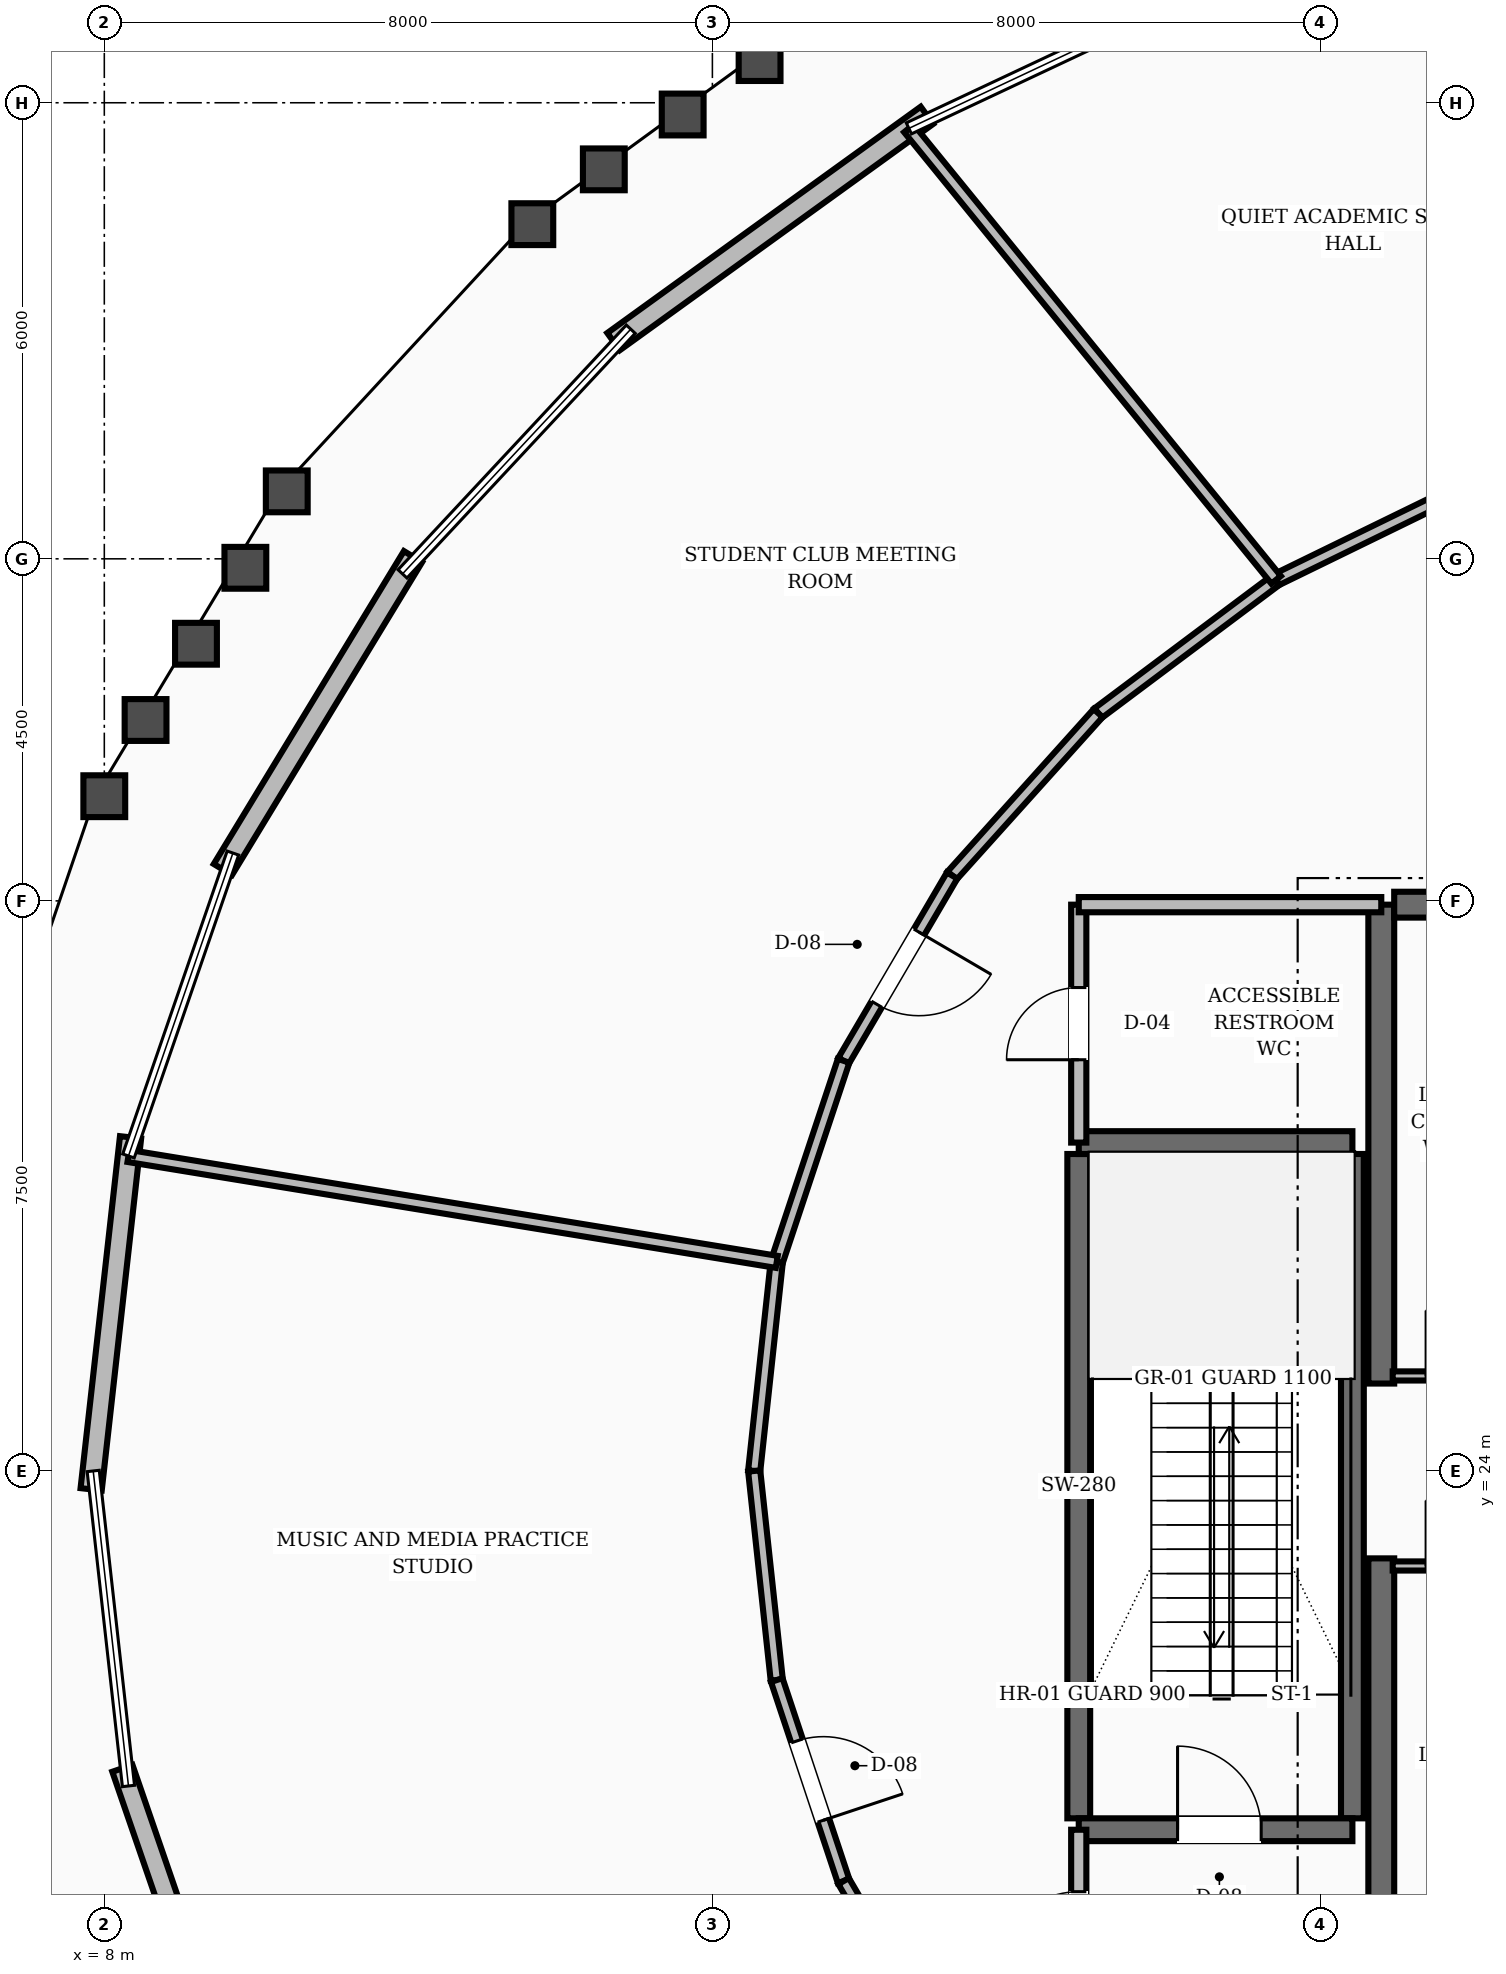
"""IFC4 building model, lengths in metres.
Left out: names, types, materials, properties, quantities, classifications, styles, units other than length and angle.
Written with IfcOpenShell. Run it as: python <this file> out.ifc"""

import sys

from ifc_helpers import new_model, si_unit, direction, frame, frame_2d, origin, place, context, subcontext, project, spatial, rectangle, extrude, element, fill, save


model = new_model("IFC4")
c1 = context("Model", 3, precision=1e-05, world=origin(), true_north=direction((0.0, 1.0)))
c2 = subcontext(c1, "Body", "Model", "MODEL_VIEW")
j1 = project(units=[si_unit("LENGTHUNIT", "METRE"), si_unit("PLANEANGLEUNIT", "RADIAN")], contexts=[c1])
p1 = place(None, origin())
s1 = spatial("IfcSite", under=j1, at=p1, CompositionType="ELEMENT")
p2 = place(p1, origin())
s2 = spatial("IfcBuilding", under=s1, at=p2, CompositionType="ELEMENT")
p3 = place(p2, frame((0.0, 0.0, 203.6)))
s3 = spatial("IfcBuildingStorey", under=s2, at=p3, CompositionType="ELEMENT", Elevation=203.6)
for number, where, z_axis, x_axis in (
    (1, (24.8, 16.55, 0.0), (0.0, 0.0, 1.0), (0.0, 1.0, 0.0)),
    (2, (24.8, 25.15, 0.0), (0.0, 0.0, 1.0), (0.0, 1.0, 0.0)),
):
    element("IfcWall", number, at=place(p3, frame(where, z_axis=z_axis, x_axis=x_axis)), inside=s3, PredefinedType="SHEAR", context=c2, shape_type="SweptSolid", body=[
        extrude(rectangle(XDim=6.3, YDim=0.34, at=frame_2d((3.15, 0.0))), origin(), (0.0, 0.0, 1.0), 4.8),
    ])
p4 = place(p3, frame((24.97, 31.45, 0.0), z_axis=(0.0, 0.0, 1.0), x_axis=(1.0, 0.0, 0.0)))
e3 = element("IfcWall", 3, at=p4, inside=s3, PredefinedType="SHEAR", context=c2, shape_type="SweptSolid", body=[
    extrude(rectangle(XDim=3.23, YDim=0.34, at=frame_2d((1.615, 0.0))), origin(), (0.0, 0.0, 1.0), 4.8),
])
for number, where, z_axis, x_axis in (
    (4, (20.82, 19.43, 0.0), (0.0, 0.0, 1.0), (0.0, 1.0, 0.0)),
    (5, (24.42, 19.43, 0.0), (0.0, 0.0, 1.0), (0.0, 1.0, 0.0)),
):
    element("IfcWall", number, at=place(p3, frame(where, z_axis=z_axis, x_axis=x_axis)), inside=s3, PredefinedType="SHEAR", context=c2, shape_type="SweptSolid", body=[
        extrude(rectangle(XDim=8.74, YDim=0.3, at=frame_2d((4.37, 0.0))), origin(), (0.0, 0.0, 1.0), 4.8),
    ])
p5 = place(p3, frame((20.82, 19.28, 0.0), z_axis=(0.0, 0.0, 1.0), x_axis=(1.0, 0.0, 0.0)))
e6 = element("IfcWall", 6, at=p5, inside=s3, PredefinedType="SHEAR", context=c2, shape_type="SweptSolid", body=[
    extrude(rectangle(XDim=3.6, YDim=0.3, at=frame_2d((1.8, 0.0))), origin(), (0.0, 0.0, 1.0), 4.8),
])
p6 = place(p5, frame((1.3, 0.0, 0.0)))
e7 = element("IfcOpeningElement", 7, at=p6, cuts=e6, PredefinedType="OPENING", context=c2, shape_type="SweptSolid", body=[
    extrude(rectangle(XDim=1.1, YDim=2.1, at=frame_2d((0.55, 1.05))), frame((0.0, 0.16, 0.0), z_axis=(0.0, -1.0, 0.0), x_axis=(1.0, 0.0, 0.0)), (0.0, 0.0, 1.0), 0.32),
])
p7 = place(p3, frame((20.82, 28.32, 0.0), z_axis=(0.0, 0.0, 1.0), x_axis=(1.0, 0.0, 0.0)))
e8 = element("IfcWall", 8, at=p7, inside=s3, PredefinedType="SHEAR", context=c2, shape_type="SweptSolid", body=[
    extrude(rectangle(XDim=3.6, YDim=0.3, at=frame_2d((1.8, 0.0))), origin(), (0.0, 0.0, 1.0), 4.8),
])
p8 = place(p3, frame((18.823, 41.834, 0.0), z_axis=(0.0, 0.0, 1.0), x_axis=(-0.810767835241, -0.585367847886, 0.0)))
e9 = element("IfcWall", 9, at=p8, inside=s3, PredefinedType="STANDARD", context=c2, shape_type="SweptSolid", body=[
    extrude(rectangle(XDim=5.085, YDim=0.28, at=frame_2d((2.543, 0.0))), origin(), (0.0, 0.0, 1.0), 3.71),
])
p9 = place(p3, frame((12.061, 36.029, 0.0), z_axis=(0.0, 0.0, 1.0), x_axis=(-0.519273052392, -0.854608388129, 0.0)))
e10 = element("IfcWall", 10, at=p9, inside=s3, PredefinedType="STANDARD", context=c2, shape_type="SweptSolid", body=[
    extrude(rectangle(XDim=4.817, YDim=0.28, at=frame_2d((2.408, 0.0))), origin(), (0.0, 0.0, 1.0), 3.71),
])
p10 = place(p3, frame((8.345, 28.389, 0.0), z_axis=(0.0, 0.0, 1.0), x_axis=(-0.111236598317, -0.993793952082, 0.0)))
e11 = element("IfcWall", 11, at=p10, inside=s3, PredefinedType="STANDARD", context=c2, shape_type="SweptSolid", body=[
    extrude(rectangle(XDim=4.659, YDim=0.28, at=frame_2d((2.33, 0.0))), origin(), (0.0, 0.0, 1.0), 3.71),
])
p11 = place(p3, frame((8.238, 20.088, 0.0), z_axis=(0.0, 0.0, 1.0), x_axis=(0.325950789295, -0.945386737244, 0.0)))
e12 = element("IfcWall", 12, at=p11, inside=s3, PredefinedType="STANDARD", context=c2, shape_type="SweptSolid", body=[
    extrude(rectangle(XDim=4.715, YDim=0.28, at=frame_2d((2.357, 0.0))), origin(), (0.0, 0.0, 1.0), 3.71),
])
p12 = place(p3, frame((20.82, 16.55, 0.0), z_axis=(0.0, 0.0, 1.0), x_axis=(0.0, 1.0, 0.0)))
e13 = element("IfcWall", 13, at=p12, inside=s3, PredefinedType="SOLIDWALL", context=c2, shape_type="SweptSolid", body=[
    extrude(rectangle(XDim=2.73, YDim=0.2, at=frame_2d((1.365, 0.0))), origin(), (0.0, 0.0, 1.0), 3.71),
])
p13 = place(p12, frame((0.815, 0.0, 0.0)))
e14 = element("IfcOpeningElement", 14, at=p13, cuts=e13, PredefinedType="OPENING", context=c2, shape_type="SweptSolid", body=[
    extrude(rectangle(XDim=1.1, YDim=2.1, at=frame_2d((0.55, 1.05))), frame((0.0, 0.11, 0.0), z_axis=(0.0, -1.0, 0.0), x_axis=(1.0, 0.0, 0.0)), (0.0, 0.0, 1.0), 0.22),
])
p14 = place(p3, frame((20.82, 28.32, 0.0), z_axis=(0.0, 0.0, 1.0), x_axis=(0.0, 1.0, 0.0)))
e15 = element("IfcWall", 15, at=p14, inside=s3, PredefinedType="SOLIDWALL", context=c2, shape_type="SweptSolid", body=[
    extrude(rectangle(XDim=3.13, YDim=0.2, at=frame_2d((1.565, 0.0))), origin(), (0.0, 0.0, 1.0), 3.71),
])
p15 = place(p14, frame((1.09, 0.0, 0.0)))
e16 = element("IfcOpeningElement", 16, at=p15, cuts=e15, PredefinedType="OPENING", context=c2, shape_type="SweptSolid", body=[
    extrude(rectangle(XDim=0.95, YDim=2.1, at=frame_2d((0.475, 1.05))), frame((0.0, 0.11, 0.0), z_axis=(0.0, -1.0, 0.0), x_axis=(1.0, 0.0, 0.0)), (0.0, 0.0, 1.0), 0.22),
])
p16 = place(p3, frame((20.82, 31.45, 0.0), z_axis=(0.0, 0.0, 1.0), x_axis=(1.0, 0.0, 0.0)))
e17 = element("IfcWall", 17, at=p16, inside=s3, PredefinedType="SOLIDWALL", context=c2, shape_type="SweptSolid", body=[
    extrude(rectangle(XDim=3.98, YDim=0.2, at=frame_2d((1.99, 0.0))), origin(), (0.0, 0.0, 1.0), 3.71),
])
p17 = place(p3, frame((24.95, 25.25, 0.0), z_axis=(0.0, 0.0, 1.0), x_axis=(1.0, 0.0, 0.0)))
e18 = element("IfcWall", 18, at=p17, inside=s3, PredefinedType="PARTITIONING", context=c2, shape_type="SweptSolid", body=[
    extrude(rectangle(XDim=3.2, YDim=0.12, at=frame_2d((1.6, 0.0))), origin(), (0.0, 0.0, 1.0), 3.71),
])
p18 = place(p17, frame((0.44, 0.0, 0.0)))
e19 = element("IfcOpeningElement", 19, at=p18, cuts=e18, PredefinedType="OPENING", context=c2, shape_type="SweptSolid", body=[
    extrude(rectangle(XDim=0.86, YDim=2.1, at=frame_2d((0.43, 1.05))), frame((0.0, 0.07, 0.0), z_axis=(0.0, -1.0, 0.0), x_axis=(1.0, 0.0, 0.0)), (0.0, 0.0, 1.0), 0.14),
])
p19 = place(p17, frame((1.9, 0.0, 0.0)))
e20 = element("IfcOpeningElement", 20, at=p19, cuts=e18, PredefinedType="OPENING", context=c2, shape_type="SweptSolid", body=[
    extrude(rectangle(XDim=0.86, YDim=2.1, at=frame_2d((0.43, 1.05))), frame((0.0, 0.07, 0.0), z_axis=(0.0, -1.0, 0.0), x_axis=(1.0, 0.0, 0.0)), (0.0, 0.0, 1.0), 0.14),
])
p20 = place(p3, frame((24.95, 22.75, 0.0), z_axis=(0.0, 0.0, 1.0), x_axis=(1.0, 0.0, 0.0)))
e21 = element("IfcWall", 21, at=p20, inside=s3, PredefinedType="PARTITIONING", context=c2, shape_type="SweptSolid", body=[
    extrude(rectangle(XDim=3.2, YDim=0.12, at=frame_2d((1.6, 0.0))), origin(), (0.0, 0.0, 1.0), 3.71),
])
p21 = place(p20, frame((0.44, 0.0, 0.0)))
e22 = element("IfcOpeningElement", 22, at=p21, cuts=e21, PredefinedType="OPENING", context=c2, shape_type="SweptSolid", body=[
    extrude(rectangle(XDim=0.86, YDim=2.1, at=frame_2d((0.43, 1.05))), frame((0.0, 0.07, 0.0), z_axis=(0.0, -1.0, 0.0), x_axis=(1.0, 0.0, 0.0)), (0.0, 0.0, 1.0), 0.14),
])
p22 = place(p20, frame((1.9, 0.0, 0.0)))
e23 = element("IfcOpeningElement", 23, at=p22, cuts=e21, PredefinedType="OPENING", context=c2, shape_type="SweptSolid", body=[
    extrude(rectangle(XDim=0.86, YDim=2.1, at=frame_2d((0.43, 1.05))), frame((0.0, 0.07, 0.0), z_axis=(0.0, -1.0, 0.0), x_axis=(1.0, 0.0, 0.0)), (0.0, 0.0, 1.0), 0.14),
])
p23 = place(p3, frame((26.087, 37.027, 0.0), z_axis=(0.0, 0.0, 1.0), x_axis=(-0.898755022802, -0.438451147778, 0.0)))
e24 = element("IfcWall", 24, at=p23, inside=s3, PredefinedType="SOLIDWALL", context=c2, shape_type="SweptSolid", body=[
    extrude(rectangle(XDim=2.972, YDim=0.16, at=frame_2d((1.486, 0.0))), origin(), (0.0, 0.0, 1.0), 3.71),
])
p24 = place(p3, frame((23.417, 35.724, 0.0), z_axis=(0.0, 0.0, 1.0), x_axis=(-0.800420462314, -0.599438973966, 0.0)))
e25 = element("IfcWall", 25, at=p24, inside=s3, PredefinedType="SOLIDWALL", context=c2, shape_type="SweptSolid", body=[
    extrude(rectangle(XDim=2.925, YDim=0.16, at=frame_2d((1.462, 0.0))), origin(), (0.0, 0.0, 1.0), 3.71),
])
p25 = place(p3, frame((21.075, 33.97, 0.0), z_axis=(0.0, 0.0, 1.0), x_axis=(-0.668645478294, -0.743581350194, 0.0)))
e26 = element("IfcWall", 26, at=p25, inside=s3, PredefinedType="SOLIDWALL", context=c2, shape_type="SweptSolid", body=[
    extrude(rectangle(XDim=2.874, YDim=0.16, at=frame_2d((1.437, 0.0))), origin(), (0.0, 0.0, 1.0), 3.71),
])
p26 = place(p3, frame((19.154, 31.833, 0.0), z_axis=(0.0, 0.0, 1.0), x_axis=(-0.505380130961, -0.862896820732, 0.0)))
e27 = element("IfcWall", 27, at=p26, inside=s3, PredefinedType="SOLIDWALL", context=c2, shape_type="SweptSolid", body=[
    extrude(rectangle(XDim=2.825, YDim=0.16, at=frame_2d((1.413, 0.0))), origin(), (0.0, 0.0, 1.0), 3.71),
])
p27 = place(p26, frame((0.863, 0.0, 0.0)))
e28 = element("IfcOpeningElement", 28, at=p27, cuts=e27, PredefinedType="OPENING", context=c2, shape_type="SweptSolid", body=[
    extrude(rectangle(XDim=1.1, YDim=2.1, at=frame_2d((0.55, 1.05))), frame((0.0, 0.09, 0.0), z_axis=(0.0, -1.0, 0.0), x_axis=(1.0, 0.0, 0.0)), (0.0, 0.0, 1.0), 0.18),
])
p28 = place(p3, frame((17.726, 29.396, 0.0), z_axis=(0.0, 0.0, 1.0), x_axis=(-0.315413058649, -0.948954478589, 0.0)))
e29 = element("IfcWall", 29, at=p28, inside=s3, PredefinedType="SOLIDWALL", context=c2, shape_type="SweptSolid", body=[
    extrude(rectangle(XDim=2.787, YDim=0.16, at=frame_2d((1.394, 0.0))), origin(), (0.0, 0.0, 1.0), 3.71),
])
for number, where, z_axis, x_axis in (
    (30, (16.847, 26.751, 0.0), (0.0, 0.0, 1.0), (-0.107, -0.994, 0.0)),
    (31, (16.55, 24.0, 0.0), (0.0, 0.0, 1.0), (0.107, -0.994, 0.0)),
):
    element("IfcWall", number, at=place(p3, frame(where, z_axis=z_axis, x_axis=x_axis)), inside=s3, PredefinedType="SOLIDWALL", context=c2, shape_type="SweptSolid", body=[
        extrude(rectangle(XDim=2.767, YDim=0.16, at=frame_2d((1.383, 0.0))), origin(), (0.0, 0.0, 1.0), 3.71),
    ])
p29 = place(p3, frame((16.847, 21.249, 0.0), z_axis=(0.0, 0.0, 1.0), x_axis=(0.315413058649, -0.948954478589, 0.0)))
e32 = element("IfcWall", 32, at=p29, inside=s3, PredefinedType="SOLIDWALL", context=c2, shape_type="SweptSolid", body=[
    extrude(rectangle(XDim=2.787, YDim=0.16, at=frame_2d((1.394, 0.0))), origin(), (0.0, 0.0, 1.0), 3.71),
])
p30 = place(p29, frame((0.844, 0.0, 0.0)))
e33 = element("IfcOpeningElement", 33, at=p30, cuts=e32, PredefinedType="OPENING", context=c2, shape_type="SweptSolid", body=[
    extrude(rectangle(XDim=1.1, YDim=2.1, at=frame_2d((0.55, 1.05))), frame((0.0, 0.09, 0.0), z_axis=(0.0, -1.0, 0.0), x_axis=(1.0, 0.0, 0.0)), (0.0, 0.0, 1.0), 0.18),
])
p31 = place(p3, frame((17.726, 18.604, 0.0), z_axis=(0.0, 0.0, 1.0), x_axis=(0.505380130961, -0.862896820732, 0.0)))
e34 = element("IfcWall", 34, at=p31, inside=s3, PredefinedType="SOLIDWALL", context=c2, shape_type="SweptSolid", body=[
    extrude(rectangle(XDim=2.825, YDim=0.16, at=frame_2d((1.413, 0.0))), origin(), (0.0, 0.0, 1.0), 3.71),
])
p32 = place(p3, frame((23.417, 35.724, 0.0), z_axis=(0.0, 0.0, 1.0), x_axis=(-0.631040308845, 0.775750042613, 0.0)))
e35 = element("IfcWall", 35, at=p32, inside=s3, PredefinedType="SOLIDWALL", context=c2, shape_type="SweptSolid", body=[
    extrude(rectangle(XDim=7.656, YDim=0.16, at=frame_2d((3.828, 0.0))), origin(), (0.0, 0.0, 1.0), 3.71),
])
p33 = place(p3, frame((16.847, 26.751, 0.0), z_axis=(0.0, 0.0, 1.0), x_axis=(-0.986913436685, 0.161250948808, 0.0)))
e36 = element("IfcWall", 36, at=p33, inside=s3, PredefinedType="SOLIDWALL", context=c2, shape_type="SweptSolid", body=[
    extrude(rectangle(XDim=8.642, YDim=0.16, at=frame_2d((4.321, 0.0))), origin(), (0.0, 0.0, 1.0), 3.71),
])
p34 = place(p6, origin())
e37 = element("IfcDoor", 37, at=p34, inside=s3, OperationType="SINGLE_SWING_LEFT", PredefinedType="DOOR", context=c2, shape_type="SweptSolid", body=[
    extrude(rectangle(XDim=1.1, YDim=2.1, at=frame_2d((0.55, 1.05))), frame((0.0, 0.025, 0.0), z_axis=(0.0, -1.0, 0.0), x_axis=(1.0, 0.0, 0.0)), (0.0, 0.0, 1.0), 0.05),
])
fill(e7, e37)
p35 = place(p13, origin())
e38 = element("IfcDoor", 38, at=p35, inside=s3, OperationType="SINGLE_SWING_LEFT", PredefinedType="DOOR", context=c2, shape_type="SweptSolid", body=[
    extrude(rectangle(XDim=1.1, YDim=2.1, at=frame_2d((0.55, 1.05))), frame((0.0, 0.025, 0.0), z_axis=(0.0, -1.0, 0.0), x_axis=(1.0, 0.0, 0.0)), (0.0, 0.0, 1.0), 0.05),
])
fill(e14, e38)
p36 = place(p15, origin())
e39 = element("IfcDoor", 39, at=p36, inside=s3, OperationType="SINGLE_SWING_LEFT", PredefinedType="DOOR", context=c2, shape_type="SweptSolid", body=[
    extrude(rectangle(XDim=0.95, YDim=2.1, at=frame_2d((0.475, 1.05))), frame((0.0, 0.025, 0.0), z_axis=(0.0, -1.0, 0.0), x_axis=(1.0, 0.0, 0.0)), (0.0, 0.0, 1.0), 0.05),
])
fill(e16, e39)
p37 = place(p18, origin())
e40 = element("IfcDoor", 40, at=p37, inside=s3, OperationType="SINGLE_SWING_LEFT", PredefinedType="DOOR", context=c2, shape_type="SweptSolid", body=[
    extrude(rectangle(XDim=0.86, YDim=2.1, at=frame_2d((0.43, 1.05))), frame((0.0, 0.025, 0.0), z_axis=(0.0, -1.0, 0.0), x_axis=(1.0, 0.0, 0.0)), (0.0, 0.0, 1.0), 0.05),
])
fill(e19, e40)
p38 = place(p21, origin())
e41 = element("IfcDoor", 41, at=p38, inside=s3, OperationType="SINGLE_SWING_LEFT", PredefinedType="DOOR", context=c2, shape_type="SweptSolid", body=[
    extrude(rectangle(XDim=0.86, YDim=2.1, at=frame_2d((0.43, 1.05))), frame((0.0, 0.025, 0.0), z_axis=(0.0, -1.0, 0.0), x_axis=(1.0, 0.0, 0.0)), (0.0, 0.0, 1.0), 0.05),
])
fill(e22, e41)
p39 = place(p27, origin())
e42 = element("IfcDoor", 42, at=p39, inside=s3, OperationType="SINGLE_SWING_LEFT", PredefinedType="DOOR", context=c2, shape_type="SweptSolid", body=[
    extrude(rectangle(XDim=1.1, YDim=2.1, at=frame_2d((0.55, 1.05))), frame((0.0, 0.025, 0.0), z_axis=(0.0, -1.0, 0.0), x_axis=(1.0, 0.0, 0.0)), (0.0, 0.0, 1.0), 0.05),
])
fill(e28, e42)
p40 = place(p30, origin())
e43 = element("IfcDoor", 43, at=p40, inside=s3, OperationType="SINGLE_SWING_RIGHT", PredefinedType="DOOR", context=c2, shape_type="SweptSolid", body=[
    extrude(rectangle(XDim=1.1, YDim=2.1, at=frame_2d((0.55, 1.05))), frame((0.0, 0.025, 0.0), z_axis=(0.0, -1.0, 0.0), x_axis=(1.0, 0.0, 0.0)), (0.0, 0.0, 1.0), 0.05),
])
fill(e33, e43)
save(model, sys.argv[1])
